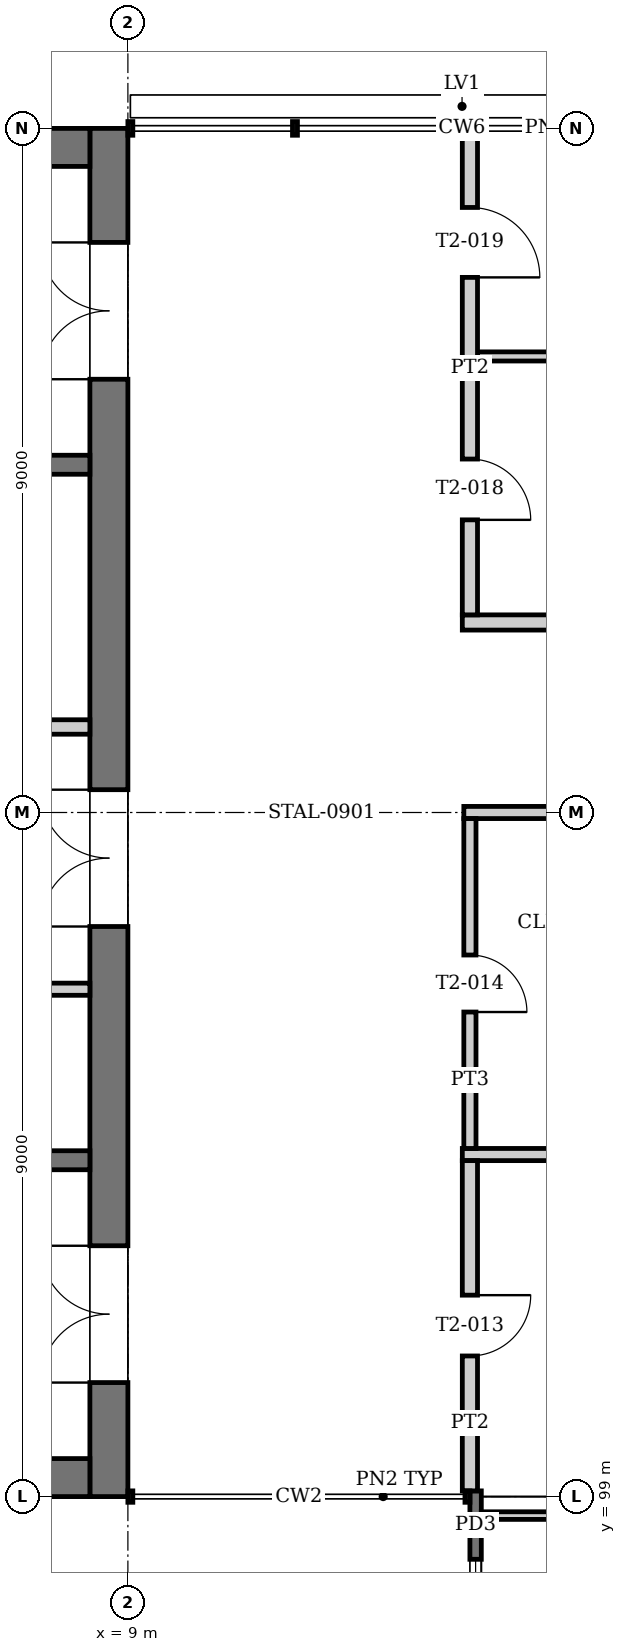
"""IFC4 building model, lengths in metres.
Left out: names, types, materials, properties, quantities, classifications, styles, units other than length and angle.
Written with IfcOpenShell. Run it as: python <this file> out.ifc"""

import sys

from ifc_helpers import new_model, si_unit, direction, frame, frame_2d, origin, place, context, subcontext, project, spatial, rectangle, extrude, element, fill, save


model = new_model("IFC4")
c1 = context("Model", 3, precision=1e-05, world=origin(), true_north=direction((0.0, 1.0)))
c2 = subcontext(c1, "Body", "Model", "MODEL_VIEW")
j1 = project(units=[si_unit("LENGTHUNIT", "METRE"), si_unit("PLANEANGLEUNIT", "RADIAN")], contexts=[c1])
p1 = place(None, origin())
s1 = spatial("IfcSite", under=j1, at=p1, CompositionType="ELEMENT")
p2 = place(p1, origin())
s2 = spatial("IfcBuilding", under=s1, at=p2, CompositionType="ELEMENT")
p3 = place(p2, frame((0.0, 0.0, 39.2)))
s3 = spatial("IfcBuildingStorey", under=s2, at=p3, CompositionType="ELEMENT", Elevation=39.2)
p4 = place(p3, frame((8.75, 99.0, 0.0), z_axis=(0.0, 0.0, 1.0), x_axis=(0.0, 1.0, 0.0)))
e1 = element("IfcWall", 1, at=p4, inside=s3, PredefinedType="SHEAR", context=c2, shape_type="SweptSolid", body=[
    extrude(rectangle(XDim=18.0, YDim=0.5, at=frame_2d((9.0, 0.0))), origin(), (0.0, 0.0, 1.0), 4.0),
])
p5 = place(p4, frame((1.5, 0.0, 0.0)))
e2 = element("IfcOpeningElement", 2, at=p5, cuts=e1, PredefinedType="OPENING", context=c2, shape_type="SweptSolid", body=[
    extrude(rectangle(XDim=1.8, YDim=2.1, at=frame_2d((0.9, 1.05))), frame((0.0, 0.26, 0.0), z_axis=(0.0, -1.0, 0.0), x_axis=(1.0, 0.0, 0.0)), (0.0, 0.0, 1.0), 0.52),
])
p6 = place(p4, frame((14.7, 0.0, 0.0)))
e3 = element("IfcOpeningElement", 3, at=p6, cuts=e1, PredefinedType="OPENING", context=c2, shape_type="SweptSolid", body=[
    extrude(rectangle(XDim=1.8, YDim=2.1, at=frame_2d((0.9, 1.05))), frame((0.0, 0.26, 0.0), z_axis=(0.0, -1.0, 0.0), x_axis=(1.0, 0.0, 0.0)), (0.0, 0.0, 1.0), 0.52),
])
p7 = place(p4, frame((7.5, 0.0, 0.0)))
e4 = element("IfcOpeningElement", 4, at=p7, cuts=e1, PredefinedType="OPENING", context=c2, shape_type="SweptSolid", body=[
    extrude(rectangle(XDim=1.8, YDim=2.1, at=frame_2d((0.9, 1.05))), frame((0.0, 0.26, 0.0), z_axis=(0.0, -1.0, 0.0), x_axis=(1.0, 0.0, 0.0)), (0.0, 0.0, 1.0), 0.52),
])
for number, where, z_axis, x_axis in (
    (5, (0.5, 99.25, 0.0), (0.0, 0.0, 1.0), (1.0, 0.0, 0.0)),
    (6, (0.5, 116.75, 0.0), (0.0, 0.0, 1.0), (1.0, 0.0, 0.0)),
):
    element("IfcWall", number, at=place(p3, frame(where, z_axis=z_axis, x_axis=x_axis)), inside=s3, PredefinedType="SHEAR", context=c2, shape_type="SweptSolid", body=[
        extrude(rectangle(XDim=8.0, YDim=0.5, at=frame_2d((4.0, 0.0))), origin(), (0.0, 0.0, 1.0), 4.0),
    ])
p8 = place(p3, frame((13.575, 95.55, -0.15), z_axis=(0.0, 0.0, 1.0), x_axis=(0.0, 1.0, 0.0)))
e7 = element("IfcWall", 7, at=p8, inside=s3, PredefinedType="SOLIDWALL", context=c2, shape_type="SweptSolid", body=[
    extrude(rectangle(XDim=3.525, YDim=0.15, at=frame_2d((1.762, 0.0))), origin(), (0.0, 0.0, 1.0), 2.75),
])
p9 = place(p8, frame((0.625, 0.0, 1.05)))
e8 = element("IfcOpeningElement", 8, at=p9, cuts=e7, PredefinedType="OPENING", context=c2, shape_type="SweptSolid", body=[
    extrude(rectangle(XDim=2.0, YDim=1.4, at=frame_2d((1.0, 0.7))), frame((0.0, 0.085, 0.0), z_axis=(0.0, -1.0, 0.0), x_axis=(1.0, 0.0, 0.0)), (0.0, 0.0, 1.0), 0.17),
])
p10 = place(p3, frame((13.65, 98.75, 0.0), z_axis=(0.0, 0.0, 1.0), x_axis=(1.0, 0.0, 0.0)))
e9 = element("IfcWall", 9, at=p10, inside=s3, PredefinedType="PARTITIONING", context=c2, shape_type="SweptSolid", body=[
    extrude(rectangle(XDim=17.7, YDim=0.1, at=frame_2d((8.85, 0.0))), origin(), (0.0, 0.0, 1.0), 2.6),
])
p11 = place(p10, frame((8.35, 0.0, 0.0)))
e10 = element("IfcOpeningElement", 10, at=p11, cuts=e9, PredefinedType="OPENING", context=c2, shape_type="SweptSolid", body=[
    extrude(rectangle(XDim=0.9, YDim=2.1, at=frame_2d((0.45, 1.05))), frame((0.0, 0.06, 0.0), z_axis=(0.0, -1.0, 0.0), x_axis=(1.0, 0.0, 0.0)), (0.0, 0.0, 1.0), 0.12),
])
for number, where, z_axis, x_axis in (
    (11, (8.5, 103.425, 0.0), (0.0, 0.0, 1.0), (-1.0, 0.0, 0.0)),
    (12, (8.5, 112.575, 0.0), (0.0, 0.0, 1.0), (-1.0, 0.0, 0.0)),
):
    element("IfcWall", number, at=place(p3, frame(where, z_axis=z_axis, x_axis=x_axis)), inside=s3, PredefinedType="SOLIDWALL", context=c2, shape_type="SweptSolid", body=[
        extrude(rectangle(XDim=8.0, YDim=0.25, at=frame_2d((4.0, 0.0))), origin(), (0.0, 0.0, 1.0), 3.75),
    ])
p12 = place(p3, frame((8.5, 105.675, 0.0), z_axis=(0.0, 0.0, 1.0), x_axis=(-1.0, 0.0, 0.0)))
e13 = element("IfcWall", 13, at=p12, inside=s3, PredefinedType="PARTITIONING", context=c2, shape_type="SweptSolid", body=[
    extrude(rectangle(XDim=2.6, YDim=0.16, at=frame_2d((1.3, 0.0))), origin(), (0.0, 0.0, 1.0), 3.75),
])
p13 = place(p12, frame((0.7, 0.0, 0.0)))
e14 = element("IfcOpeningElement", 14, at=p13, cuts=e13, PredefinedType="OPENING", context=c2, shape_type="SweptSolid", body=[
    extrude(rectangle(XDim=1.2, YDim=2.1, at=frame_2d((0.6, 1.05))), frame((0.0, 0.09, 0.0), z_axis=(0.0, -1.0, 0.0), x_axis=(1.0, 0.0, 0.0)), (0.0, 0.0, 1.0), 0.18),
])
p14 = place(p3, frame((8.5, 109.125, 0.0), z_axis=(0.0, 0.0, 1.0), x_axis=(-1.0, 0.0, 0.0)))
e15 = element("IfcWall", 15, at=p14, inside=s3, PredefinedType="PARTITIONING", context=c2, shape_type="SweptSolid", body=[
    extrude(rectangle(XDim=2.6, YDim=0.19, at=frame_2d((1.3, 0.0))), origin(), (0.0, 0.0, 1.0), 3.75),
])
p15 = place(p14, frame((0.84, 0.0, 0.0)))
e16 = element("IfcOpeningElement", 16, at=p15, cuts=e15, PredefinedType="OPENING", context=c2, shape_type="SweptSolid", body=[
    extrude(rectangle(XDim=0.92, YDim=2.1, at=frame_2d((0.46, 1.05))), frame((0.0, 0.105, 0.0), z_axis=(0.0, -1.0, 0.0), x_axis=(1.0, 0.0, 0.0)), (0.0, 0.0, 1.0), 0.21),
])
p16 = place(p3, frame((13.4, 103.5, 0.0), z_axis=(0.0, 0.0, 1.0), x_axis=(1.0, 0.0, 0.0)))
e17 = element("IfcWall", 17, at=p16, inside=s3, PredefinedType="PARTITIONING", context=c2, shape_type="SweptSolid", body=[
    extrude(rectangle(XDim=4.68, YDim=0.16, at=frame_2d((2.34, 0.0))), origin(), (0.0, 0.0, 1.0), 3.05),
])
p17 = place(p3, frame((13.42, 108.0, 0.0), z_axis=(0.0, 0.0, 1.0), x_axis=(1.0, 0.0, 0.0)))
e18 = element("IfcWall", 18, at=p17, inside=s3, PredefinedType="PARTITIONING", context=c2, shape_type="SweptSolid", body=[
    extrude(rectangle(XDim=4.66, YDim=0.16, at=frame_2d((2.33, 0.0))), origin(), (0.0, 0.0, 1.0), 3.05),
])
p18 = place(p3, frame((13.4, 110.5, 0.0), z_axis=(0.0, 0.0, 1.0), x_axis=(1.0, 0.0, 0.0)))
e19 = element("IfcWall", 19, at=p18, inside=s3, PredefinedType="PARTITIONING", context=c2, shape_type="SweptSolid", body=[
    extrude(rectangle(XDim=27.2, YDim=0.2, at=frame_2d((13.6, 0.0))), origin(), (0.0, 0.0, 1.0), 3.05),
])
p19 = place(p18, frame((6.35, 0.0, 0.0)))
e20 = element("IfcOpeningElement", 20, at=p19, cuts=e19, PredefinedType="OPENING", context=c2, shape_type="SweptSolid", body=[
    extrude(rectangle(XDim=1.0, YDim=2.1, at=frame_2d((0.5, 1.05))), frame((0.0, 0.11, 0.0), z_axis=(0.0, -1.0, 0.0), x_axis=(1.0, 0.0, 0.0)), (0.0, 0.0, 1.0), 0.22),
])
p20 = place(p18, frame((10.85, 0.0, 0.0)))
e21 = element("IfcOpeningElement", 21, at=p20, cuts=e19, PredefinedType="OPENING", context=c2, shape_type="SweptSolid", body=[
    extrude(rectangle(XDim=1.0, YDim=2.1, at=frame_2d((0.5, 1.05))), frame((0.0, 0.11, 0.0), z_axis=(0.0, -1.0, 0.0), x_axis=(1.0, 0.0, 0.0)), (0.0, 0.0, 1.0), 0.22),
])
p21 = place(p18, frame((15.35, 0.0, 0.0)))
e22 = element("IfcOpeningElement", 22, at=p21, cuts=e19, PredefinedType="OPENING", context=c2, shape_type="SweptSolid", body=[
    extrude(rectangle(XDim=1.0, YDim=2.1, at=frame_2d((0.5, 1.05))), frame((0.0, 0.11, 0.0), z_axis=(0.0, -1.0, 0.0), x_axis=(1.0, 0.0, 0.0)), (0.0, 0.0, 1.0), 0.22),
])
p22 = place(p18, frame((19.85, 0.0, 0.0)))
e23 = element("IfcOpeningElement", 23, at=p22, cuts=e19, PredefinedType="OPENING", context=c2, shape_type="SweptSolid", body=[
    extrude(rectangle(XDim=1.0, YDim=2.1, at=frame_2d((0.5, 1.05))), frame((0.0, 0.11, 0.0), z_axis=(0.0, -1.0, 0.0), x_axis=(1.0, 0.0, 0.0)), (0.0, 0.0, 1.0), 0.22),
])
p23 = place(p18, frame((24.35, 0.0, 0.0)))
e24 = element("IfcOpeningElement", 24, at=p23, cuts=e19, PredefinedType="OPENING", context=c2, shape_type="SweptSolid", body=[
    extrude(rectangle(XDim=1.0, YDim=2.1, at=frame_2d((0.5, 1.05))), frame((0.0, 0.11, 0.0), z_axis=(0.0, -1.0, 0.0), x_axis=(1.0, 0.0, 0.0)), (0.0, 0.0, 1.0), 0.22),
])
p24 = place(p3, frame((13.6, 114.0, 0.0), z_axis=(0.0, 0.0, 1.0), x_axis=(1.0, 0.0, 0.0)))
e25 = element("IfcWall", 25, at=p24, inside=s3, PredefinedType="PARTITIONING", context=c2, shape_type="SweptSolid", body=[
    extrude(rectangle(XDim=4.325, YDim=0.12, at=frame_2d((2.163, 0.0))), origin(), (0.0, 0.0, 1.0), 3.05),
])
p25 = place(p3, frame((13.5, 99.075, 0.0), z_axis=(0.0, 0.0, 1.0), x_axis=(0.0, 1.0, 0.0)))
e26 = element("IfcWall", 26, at=p25, inside=s3, PredefinedType="PARTITIONING", context=c2, shape_type="SweptSolid", body=[
    extrude(rectangle(XDim=4.345, YDim=0.2, at=frame_2d((2.172, 0.0))), origin(), (0.0, 0.0, 1.0), 3.05),
])
p26 = place(p25, frame((1.775, 0.0, 0.0)))
e27 = element("IfcOpeningElement", 27, at=p26, cuts=e26, PredefinedType="OPENING", context=c2, shape_type="SweptSolid", body=[
    extrude(rectangle(XDim=0.8, YDim=2.1, at=frame_2d((0.4, 1.05))), frame((0.0, 0.11, 0.0), z_axis=(0.0, -1.0, 0.0), x_axis=(1.0, 0.0, 0.0)), (0.0, 0.0, 1.0), 0.22),
])
p27 = place(p3, frame((13.5, 103.58, 0.0), z_axis=(0.0, 0.0, 1.0), x_axis=(0.0, 1.0, 0.0)))
e28 = element("IfcWall", 28, at=p27, inside=s3, PredefinedType="PARTITIONING", context=c2, shape_type="SweptSolid", body=[
    extrude(rectangle(XDim=4.34, YDim=0.16, at=frame_2d((2.17, 0.0))), origin(), (0.0, 0.0, 1.0), 3.05),
])
p28 = place(p27, frame((1.795, 0.0, 0.0)))
e29 = element("IfcOpeningElement", 29, at=p28, cuts=e28, PredefinedType="OPENING", context=c2, shape_type="SweptSolid", body=[
    extrude(rectangle(XDim=0.75, YDim=2.1, at=frame_2d((0.375, 1.05))), frame((0.0, 0.09, 0.0), z_axis=(0.0, -1.0, 0.0), x_axis=(1.0, 0.0, 0.0)), (0.0, 0.0, 1.0), 0.18),
])
p29 = place(p3, frame((13.5, 110.6, 0.0), z_axis=(0.0, 0.0, 1.0), x_axis=(0.0, 1.0, 0.0)))
e30 = element("IfcWall", 30, at=p29, inside=s3, PredefinedType="PARTITIONING", context=c2, shape_type="SweptSolid", body=[
    extrude(rectangle(XDim=6.31, YDim=0.2, at=frame_2d((3.155, 0.0))), origin(), (0.0, 0.0, 1.0), 3.05),
])
p30 = place(p29, frame((1.25, 0.0, 0.0)))
e31 = element("IfcOpeningElement", 31, at=p30, cuts=e30, PredefinedType="OPENING", context=c2, shape_type="SweptSolid", body=[
    extrude(rectangle(XDim=0.8, YDim=2.1, at=frame_2d((0.4, 1.05))), frame((0.0, 0.11, 0.0), z_axis=(0.0, -1.0, 0.0), x_axis=(1.0, 0.0, 0.0)), (0.0, 0.0, 1.0), 0.22),
])
p31 = place(p29, frame((4.44, 0.0, 0.0)))
e32 = element("IfcOpeningElement", 32, at=p31, cuts=e30, PredefinedType="OPENING", context=c2, shape_type="SweptSolid", body=[
    extrude(rectangle(XDim=0.92, YDim=2.1, at=frame_2d((0.46, 1.05))), frame((0.0, 0.11, 0.0), z_axis=(0.0, -1.0, 0.0), x_axis=(1.0, 0.0, 0.0)), (0.0, 0.0, 1.0), 0.22),
])
p32 = place(p9, origin())
e33 = element("IfcWindow", 33, at=p32, inside=s3, PartitioningType="SINGLE_PANEL", PredefinedType="WINDOW", context=c2, shape_type="SweptSolid", body=[
    extrude(rectangle(XDim=2.0, YDim=1.4, at=frame_2d((1.0, 0.7))), frame((0.0, 0.03, 0.0), z_axis=(0.0, -1.0, 0.0), x_axis=(1.0, 0.0, 0.0)), (0.0, 0.0, 1.0), 0.06),
])
fill(e8, e33)
p33 = place(p26, frame((0.8, 0.0, 0.0), z_axis=(0.0, 0.0, 1.0), x_axis=(-1.0, 0.0, 0.0)))
e34 = element("IfcDoor", 34, at=p33, inside=s3, OperationType="SINGLE_SWING_LEFT", PredefinedType="DOOR", context=c2, shape_type="SweptSolid", body=[
    extrude(rectangle(XDim=0.8, YDim=2.1, at=frame_2d((0.4, 1.05))), frame((0.0, 0.025, 0.0), z_axis=(0.0, -1.0, 0.0), x_axis=(1.0, 0.0, 0.0)), (0.0, 0.0, 1.0), 0.05),
])
fill(e27, e34)
p34 = place(p28, frame((0.75, 0.0, 0.0), z_axis=(0.0, 0.0, 1.0), x_axis=(-1.0, 0.0, 0.0)))
e35 = element("IfcDoor", 35, at=p34, inside=s3, OperationType="SINGLE_SWING_RIGHT", PredefinedType="DOOR", context=c2, shape_type="SweptSolid", body=[
    extrude(rectangle(XDim=0.75, YDim=2.1, at=frame_2d((0.375, 1.05))), frame((0.0, 0.025, 0.0), z_axis=(0.0, -1.0, 0.0), x_axis=(1.0, 0.0, 0.0)), (0.0, 0.0, 1.0), 0.05),
])
fill(e29, e35)
p35 = place(p30, frame((0.8, 0.0, 0.0), z_axis=(0.0, 0.0, 1.0), x_axis=(-1.0, 0.0, 0.0)))
e36 = element("IfcDoor", 36, at=p35, inside=s3, OperationType="SINGLE_SWING_RIGHT", PredefinedType="DOOR", context=c2, shape_type="SweptSolid", body=[
    extrude(rectangle(XDim=0.8, YDim=2.1, at=frame_2d((0.4, 1.05))), frame((0.0, 0.025, 0.0), z_axis=(0.0, -1.0, 0.0), x_axis=(1.0, 0.0, 0.0)), (0.0, 0.0, 1.0), 0.05),
])
fill(e31, e36)
p36 = place(p31, frame((0.92, 0.0, 0.0), z_axis=(0.0, 0.0, 1.0), x_axis=(-1.0, 0.0, 0.0)))
e37 = element("IfcDoor", 37, at=p36, inside=s3, OperationType="SINGLE_SWING_RIGHT", PredefinedType="DOOR", context=c2, shape_type="SweptSolid", body=[
    extrude(rectangle(XDim=0.92, YDim=2.1, at=frame_2d((0.46, 1.05))), frame((0.0, 0.025, 0.0), z_axis=(0.0, -1.0, 0.0), x_axis=(1.0, 0.0, 0.0)), (0.0, 0.0, 1.0), 0.05),
])
fill(e32, e37)
p37 = place(p5, origin())
e38 = element("IfcDoor", 38, at=p37, inside=s3, OperationType="DOUBLE_DOOR_SINGLE_SWING", PredefinedType="DOOR", context=c2, shape_type="SweptSolid", body=[
    extrude(rectangle(XDim=1.8, YDim=2.1, at=frame_2d((0.9, 1.05))), frame((0.0, 0.025, 0.0), z_axis=(0.0, -1.0, 0.0), x_axis=(1.0, 0.0, 0.0)), (0.0, 0.0, 1.0), 0.05),
])
fill(e2, e38)
p38 = place(p6, origin())
e39 = element("IfcDoor", 39, at=p38, inside=s3, OperationType="DOUBLE_DOOR_SINGLE_SWING", PredefinedType="DOOR", context=c2, shape_type="SweptSolid", body=[
    extrude(rectangle(XDim=1.8, YDim=2.1, at=frame_2d((0.9, 1.05))), frame((0.0, 0.025, 0.0), z_axis=(0.0, -1.0, 0.0), x_axis=(1.0, 0.0, 0.0)), (0.0, 0.0, 1.0), 0.05),
])
fill(e3, e39)
p39 = place(p7, origin())
e40 = element("IfcDoor", 40, at=p39, inside=s3, OperationType="DOUBLE_DOOR_SINGLE_SWING", PredefinedType="DOOR", context=c2, shape_type="SweptSolid", body=[
    extrude(rectangle(XDim=1.8, YDim=2.1, at=frame_2d((0.9, 1.05))), frame((0.0, 0.025, 0.0), z_axis=(0.0, -1.0, 0.0), x_axis=(1.0, 0.0, 0.0)), (0.0, 0.0, 1.0), 0.05),
])
fill(e4, e40)
save(model, sys.argv[1])
